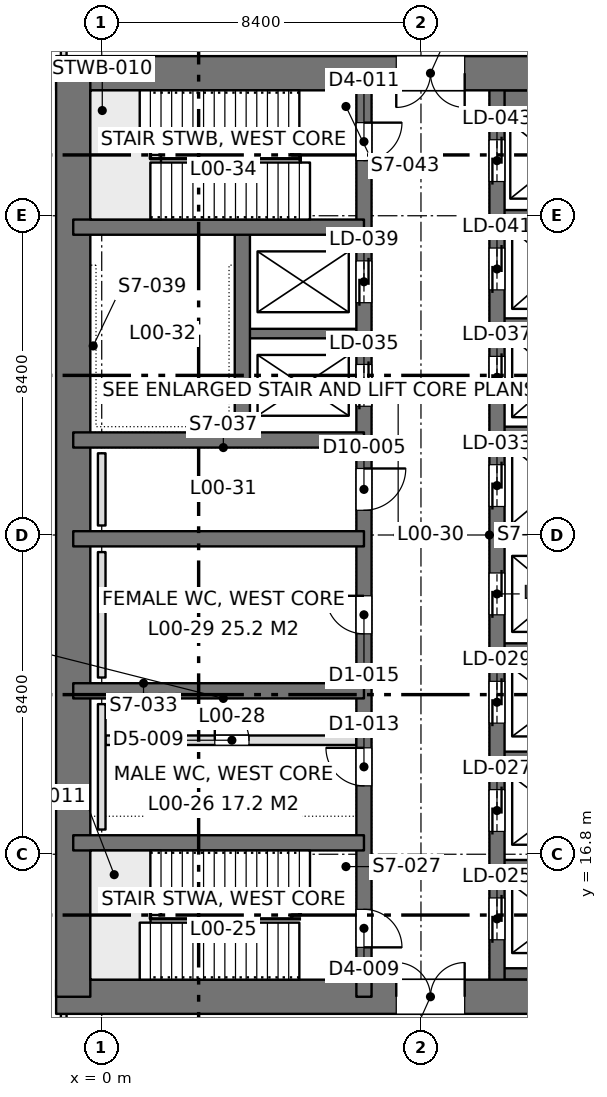
"""IFC4 building model, lengths in metres.
Left out: names, types, materials, properties, quantities, classifications, styles, units other than length and angle.
Written with IfcOpenShell. Run it as: python <this file> out.ifc"""

import sys

from ifc_helpers import new_model, si_unit, direction, frame, frame_2d, origin, place, context, subcontext, project, spatial, rectangle, extrude, element, fill, save


model = new_model("IFC4")
c1 = context("Model", 3, precision=1e-05, world=origin(), true_north=direction((0.0, 1.0)))
c2 = subcontext(c1, "Body", "Model", "MODEL_VIEW")
j1 = project(units=[si_unit("LENGTHUNIT", "METRE"), si_unit("PLANEANGLEUNIT", "RADIAN")], contexts=[c1])
p1 = place(None, origin())
s1 = spatial("IfcSite", under=j1, at=p1, CompositionType="ELEMENT")
p2 = place(p1, origin())
s2 = spatial("IfcBuilding", under=s1, at=p2, CompositionType="ELEMENT")
p3 = place(p2, origin())
s3 = spatial("IfcBuildingStorey", under=s2, at=p3, CompositionType="ELEMENT", Elevation=0.0)
p4 = place(p3, frame((-1.2, 13.05, 0.0), z_axis=(0.0, 0.0, 1.0), x_axis=(1.0, 0.0, 0.0)))
e1 = element("IfcWall", 1, at=p4, inside=s3, PredefinedType="SHEAR", context=c2, shape_type="SweptSolid", body=[
    extrude(rectangle(XDim=18.0, YDim=0.9, at=frame_2d((9.0, 0.0))), origin(), (0.0, 0.0, 1.0), 5.4),
])
p5 = place(p4, frame((8.95, 0.0, 0.0)))
e2 = element("IfcOpeningElement", 2, at=p5, cuts=e1, PredefinedType="OPENING", context=c2, shape_type="SweptSolid", body=[
    extrude(rectangle(XDim=1.8, YDim=2.4, at=frame_2d((0.9, 1.2))), frame((0.0, 0.46, 0.0), z_axis=(0.0, -1.0, 0.0), x_axis=(1.0, 0.0, 0.0)), (0.0, 0.0, 1.0), 0.92),
])
p6 = place(p3, frame((-1.2, 37.35, 0.0), z_axis=(0.0, 0.0, 1.0), x_axis=(1.0, 0.0, 0.0)))
e3 = element("IfcWall", 3, at=p6, inside=s3, PredefinedType="SHEAR", context=c2, shape_type="SweptSolid", body=[
    extrude(rectangle(XDim=18.0, YDim=0.9, at=frame_2d((9.0, 0.0))), origin(), (0.0, 0.0, 1.0), 5.4),
])
p7 = place(p6, frame((8.95, 0.0, 0.0)))
e4 = element("IfcOpeningElement", 4, at=p7, cuts=e3, PredefinedType="OPENING", context=c2, shape_type="SweptSolid", body=[
    extrude(rectangle(XDim=1.8, YDim=2.4, at=frame_2d((0.9, 1.2))), frame((0.0, 0.46, 0.0), z_axis=(0.0, -1.0, 0.0), x_axis=(1.0, 0.0, 0.0)), (0.0, 0.0, 1.0), 0.92),
])
p8 = place(p3, frame((-0.75, 13.05, 0.0), z_axis=(0.0, 0.0, 1.0), x_axis=(0.0, 1.0, 0.0)))
e5 = element("IfcWall", 5, at=p8, inside=s3, PredefinedType="SHEAR", context=c2, shape_type="SweptSolid", body=[
    extrude(rectangle(XDim=24.3, YDim=0.9, at=frame_2d((12.15, 0.0))), origin(), (0.0, 0.0, 1.0), 5.4),
])
p9 = place(p3, frame((6.9, 13.05, 0.0), z_axis=(0.0, 0.0, 1.0), x_axis=(0.0, 1.0, 0.0)))
e6 = element("IfcWall", 6, at=p9, inside=s3, PredefinedType="SHEAR", context=c2, shape_type="SweptSolid", body=[
    extrude(rectangle(XDim=24.3, YDim=0.4, at=frame_2d((12.15, 0.0))), origin(), (0.0, 0.0, 1.0), 5.4),
])
p10 = place(p9, frame((1.3, 0.0, 0.0)))
e7 = element("IfcOpeningElement", 7, at=p10, cuts=e6, PredefinedType="OPENING", context=c2, shape_type="SweptSolid", body=[
    extrude(rectangle(XDim=1.0, YDim=2.2, at=frame_2d((0.5, 1.1))), frame((0.0, 0.21, 0.0), z_axis=(0.0, -1.0, 0.0), x_axis=(1.0, 0.0, 0.0)), (0.0, 0.0, 1.0), 0.42),
])
p11 = place(p9, frame((22.0, 0.0, 0.0)))
e8 = element("IfcOpeningElement", 8, at=p11, cuts=e6, PredefinedType="OPENING", context=c2, shape_type="SweptSolid", body=[
    extrude(rectangle(XDim=1.0, YDim=2.2, at=frame_2d((0.5, 1.1))), frame((0.0, 0.21, 0.0), z_axis=(0.0, -1.0, 0.0), x_axis=(1.0, 0.0, 0.0)), (0.0, 0.0, 1.0), 0.42),
])
p12 = place(p9, frame((5.55, 0.0, 0.0)))
e9 = element("IfcOpeningElement", 9, at=p12, cuts=e6, PredefinedType="OPENING", context=c2, shape_type="SweptSolid", body=[
    extrude(rectangle(XDim=1.0, YDim=2.2, at=frame_2d((0.5, 1.1))), frame((0.0, 0.21, 0.0), z_axis=(0.0, -1.0, 0.0), x_axis=(1.0, 0.0, 0.0)), (0.0, 0.0, 1.0), 0.42),
])
p13 = place(p9, frame((9.55, 0.0, 0.0)))
e10 = element("IfcOpeningElement", 10, at=p13, cuts=e6, PredefinedType="OPENING", context=c2, shape_type="SweptSolid", body=[
    extrude(rectangle(XDim=1.0, YDim=2.2, at=frame_2d((0.5, 1.1))), frame((0.0, 0.21, 0.0), z_axis=(0.0, -1.0, 0.0), x_axis=(1.0, 0.0, 0.0)), (0.0, 0.0, 1.0), 0.42),
])
p14 = place(p9, frame((12.8, 0.0, 0.0)))
e11 = element("IfcOpeningElement", 11, at=p14, cuts=e6, PredefinedType="OPENING", context=c2, shape_type="SweptSolid", body=[
    extrude(rectangle(XDim=1.1, YDim=2.2, at=frame_2d((0.55, 1.1))), frame((0.0, 0.21, 0.0), z_axis=(0.0, -1.0, 0.0), x_axis=(1.0, 0.0, 0.0)), (0.0, 0.0, 1.0), 0.42),
])
p15 = place(p9, frame((15.538, 0.0, 0.0)))
e12 = element("IfcOpeningElement", 12, at=p15, cuts=e6, PredefinedType="OPENING", context=c2, shape_type="SweptSolid", body=[
    extrude(rectangle(XDim=1.1, YDim=2.2, at=frame_2d((0.55, 1.1))), frame((0.0, 0.21, 0.0), z_axis=(0.0, -1.0, 0.0), x_axis=(1.0, 0.0, 0.0)), (0.0, 0.0, 1.0), 0.42),
])
p16 = place(p9, frame((18.262, 0.0, 0.0)))
e13 = element("IfcOpeningElement", 13, at=p16, cuts=e6, PredefinedType="OPENING", context=c2, shape_type="SweptSolid", body=[
    extrude(rectangle(XDim=1.1, YDim=2.2, at=frame_2d((0.55, 1.1))), frame((0.0, 0.21, 0.0), z_axis=(0.0, -1.0, 0.0), x_axis=(1.0, 0.0, 0.0)), (0.0, 0.0, 1.0), 0.42),
])
p17 = place(p3, frame((10.4, 13.05, 0.0), z_axis=(0.0, 0.0, 1.0), x_axis=(0.0, 1.0, 0.0)))
e14 = element("IfcWall", 14, at=p17, inside=s3, PredefinedType="SHEAR", context=c2, shape_type="SweptSolid", body=[
    extrude(rectangle(XDim=24.3, YDim=0.4, at=frame_2d((12.15, 0.0))), origin(), (0.0, 0.0, 1.0), 5.4),
])
p18 = place(p17, frame((1.5, 0.0, 0.0)))
e15 = element("IfcOpeningElement", 15, at=p18, cuts=e14, PredefinedType="OPENING", context=c2, shape_type="SweptSolid", body=[
    extrude(rectangle(XDim=1.1, YDim=2.2, at=frame_2d((0.55, 1.1))), frame((0.0, 0.21, 0.0), z_axis=(0.0, -1.0, 0.0), x_axis=(1.0, 0.0, 0.0)), (0.0, 0.0, 1.0), 0.42),
])
p19 = place(p17, frame((4.35, 0.0, 0.0)))
e16 = element("IfcOpeningElement", 16, at=p19, cuts=e14, PredefinedType="OPENING", context=c2, shape_type="SweptSolid", body=[
    extrude(rectangle(XDim=1.1, YDim=2.2, at=frame_2d((0.55, 1.1))), frame((0.0, 0.21, 0.0), z_axis=(0.0, -1.0, 0.0), x_axis=(1.0, 0.0, 0.0)), (0.0, 0.0, 1.0), 0.42),
])
p20 = place(p17, frame((7.2, 0.0, 0.0)))
e17 = element("IfcOpeningElement", 17, at=p20, cuts=e14, PredefinedType="OPENING", context=c2, shape_type="SweptSolid", body=[
    extrude(rectangle(XDim=1.1, YDim=2.2, at=frame_2d((0.55, 1.1))), frame((0.0, 0.21, 0.0), z_axis=(0.0, -1.0, 0.0), x_axis=(1.0, 0.0, 0.0)), (0.0, 0.0, 1.0), 0.42),
])
p21 = place(p17, frame((10.05, 0.0, 0.0)))
e18 = element("IfcOpeningElement", 18, at=p21, cuts=e14, PredefinedType="OPENING", context=c2, shape_type="SweptSolid", body=[
    extrude(rectangle(XDim=1.1, YDim=2.2, at=frame_2d((0.55, 1.1))), frame((0.0, 0.21, 0.0), z_axis=(0.0, -1.0, 0.0), x_axis=(1.0, 0.0, 0.0)), (0.0, 0.0, 1.0), 0.42),
])
p22 = place(p17, frame((12.9, 0.0, 0.0)))
e19 = element("IfcOpeningElement", 19, at=p22, cuts=e14, PredefinedType="OPENING", context=c2, shape_type="SweptSolid", body=[
    extrude(rectangle(XDim=1.1, YDim=2.2, at=frame_2d((0.55, 1.1))), frame((0.0, 0.21, 0.0), z_axis=(0.0, -1.0, 0.0), x_axis=(1.0, 0.0, 0.0)), (0.0, 0.0, 1.0), 0.42),
])
p23 = place(p17, frame((15.75, 0.0, 0.0)))
e20 = element("IfcOpeningElement", 20, at=p23, cuts=e14, PredefinedType="OPENING", context=c2, shape_type="SweptSolid", body=[
    extrude(rectangle(XDim=1.1, YDim=2.2, at=frame_2d((0.55, 1.1))), frame((0.0, 0.21, 0.0), z_axis=(0.0, -1.0, 0.0), x_axis=(1.0, 0.0, 0.0)), (0.0, 0.0, 1.0), 0.42),
])
p24 = place(p17, frame((18.6, 0.0, 0.0)))
e21 = element("IfcOpeningElement", 21, at=p24, cuts=e14, PredefinedType="OPENING", context=c2, shape_type="SweptSolid", body=[
    extrude(rectangle(XDim=1.1, YDim=2.2, at=frame_2d((0.55, 1.1))), frame((0.0, 0.21, 0.0), z_axis=(0.0, -1.0, 0.0), x_axis=(1.0, 0.0, 0.0)), (0.0, 0.0, 1.0), 0.42),
])
p25 = place(p17, frame((21.45, 0.0, 0.0)))
e22 = element("IfcOpeningElement", 22, at=p25, cuts=e14, PredefinedType="OPENING", context=c2, shape_type="SweptSolid", body=[
    extrude(rectangle(XDim=1.1, YDim=2.2, at=frame_2d((0.55, 1.1))), frame((0.0, 0.21, 0.0), z_axis=(0.0, -1.0, 0.0), x_axis=(1.0, 0.0, 0.0)), (0.0, 0.0, 1.0), 0.42),
])
for number, where, z_axis, x_axis in (
    (23, (-0.75, 17.1, 0.0), (0.0, 0.0, 1.0), (1.0, 0.0, 0.0)),
    (24, (-0.75, 21.1, 0.0), (0.0, 0.0, 1.0), (1.0, 0.0, 0.0)),
    (25, (-0.75, 25.1, 0.0), (0.0, 0.0, 1.0), (1.0, 0.0, 0.0)),
    (26, (-0.75, 27.7, 0.0), (0.0, 0.0, 1.0), (1.0, 0.0, 0.0)),
    (27, (-0.75, 33.3, 0.0), (0.0, 0.0, 1.0), (1.0, 0.0, 0.0)),
):
    element("IfcWall", number, at=place(p3, frame(where, z_axis=z_axis, x_axis=x_axis)), inside=s3, PredefinedType="SHEAR", context=c2, shape_type="SweptSolid", body=[
        extrude(rectangle(XDim=7.65, YDim=0.4, at=frame_2d((3.825, 0.0))), origin(), (0.0, 0.0, 1.0), 5.4),
    ])
p26 = place(p3, frame((3.7, 27.7, 0.0), z_axis=(0.0, 0.0, 1.0), x_axis=(0.0, 1.0, 0.0)))
e28 = element("IfcWall", 28, at=p26, inside=s3, PredefinedType="SHEAR", context=c2, shape_type="SweptSolid", body=[
    extrude(rectangle(XDim=5.6, YDim=0.4, at=frame_2d((2.8, 0.0))), origin(), (0.0, 0.0, 1.0), 5.4),
])
p27 = place(p3, frame((3.7, 30.5, 0.0), z_axis=(0.0, 0.0, 1.0), x_axis=(1.0, 0.0, 0.0)))
e29 = element("IfcWall", 29, at=p27, inside=s3, PredefinedType="SHEAR", context=c2, shape_type="SweptSolid", body=[
    extrude(rectangle(XDim=3.2, YDim=0.25, at=frame_2d((1.6, 0.0))), origin(), (0.0, 0.0, 1.0), 5.4),
])
p28 = place(p3, frame((10.4, 13.65, 0.0), z_axis=(0.0, 0.0, 1.0), x_axis=(1.0, 0.0, 0.0)))
e30 = element("IfcWall", 30, at=p28, inside=s3, PredefinedType="SHEAR", context=c2, shape_type="SweptSolid", body=[
    extrude(rectangle(XDim=3.2, YDim=0.3, at=frame_2d((1.6, 0.0))), origin(), (0.0, 0.0, 1.0), 5.4),
])
for number, where, z_axis, x_axis in (
    (31, (10.4, 16.525, 0.0), (0.0, 0.0, 1.0), (1.0, 0.0, 0.0)),
    (32, (10.4, 19.375, 0.0), (0.0, 0.0, 1.0), (1.0, 0.0, 0.0)),
    (33, (10.4, 22.225, 0.0), (0.0, 0.0, 1.0), (1.0, 0.0, 0.0)),
    (34, (10.4, 25.075, 0.0), (0.0, 0.0, 1.0), (1.0, 0.0, 0.0)),
    (35, (10.4, 27.925, 0.0), (0.0, 0.0, 1.0), (1.0, 0.0, 0.0)),
    (36, (10.4, 30.775, 0.0), (0.0, 0.0, 1.0), (1.0, 0.0, 0.0)),
    (37, (10.4, 33.625, 0.0), (0.0, 0.0, 1.0), (1.0, 0.0, 0.0)),
):
    element("IfcWall", number, at=place(p3, frame(where, z_axis=z_axis, x_axis=x_axis)), inside=s3, PredefinedType="SHEAR", context=c2, shape_type="SweptSolid", body=[
        extrude(rectangle(XDim=3.2, YDim=0.25, at=frame_2d((1.6, 0.0))), origin(), (0.0, 0.0, 1.0), 5.4),
    ])
p29 = place(p3, frame((10.4, 36.625, 0.0), z_axis=(0.0, 0.0, 1.0), x_axis=(1.0, 0.0, 0.0)))
e38 = element("IfcWall", 38, at=p29, inside=s3, PredefinedType="SHEAR", context=c2, shape_type="SweptSolid", body=[
    extrude(rectangle(XDim=3.2, YDim=0.55, at=frame_2d((1.6, 0.0))), origin(), (0.0, 0.0, 1.0), 5.4),
])
p30 = place(p3, frame((-1.0, -0.926, 0.0), z_axis=(0.0, 0.0, 1.0), x_axis=(0.0, 1.0, 0.0)))
e39 = element("IfcWall", 39, at=p30, inside=s3, PredefinedType="PARTITIONING", context=c2, shape_type="SweptSolid", body=[
    extrude(rectangle(XDim=13.528, YDim=0.15, at=frame_2d((6.764, 0.0))), origin(), (0.0, 0.0, 1.0), 4.6),
])
p31 = place(p30, frame((4.626, 0.0, 0.0)))
e40 = element("IfcOpeningElement", 40, at=p31, cuts=e39, PredefinedType="OPENING", context=c2, shape_type="SweptSolid", body=[
    extrude(rectangle(XDim=1.0, YDim=2.2, at=frame_2d((0.5, 1.1))), frame((0.0, 0.085, 0.0), z_axis=(0.0, -1.0, 0.0), x_axis=(1.0, 0.0, 0.0)), (0.0, 0.0, 1.0), 0.17),
])
p32 = place(p3, frame((-1.0, 37.8, 0.0), z_axis=(0.0, 0.0, 1.0), x_axis=(0.0, 1.0, 0.0)))
e41 = element("IfcWall", 41, at=p32, inside=s3, PredefinedType="PARTITIONING", context=c2, shape_type="SweptSolid", body=[
    extrude(rectangle(XDim=6.48, YDim=0.15, at=frame_2d((3.24, 0.0))), origin(), (0.0, 0.0, 1.0), 4.6),
])
p33 = place(p32, frame((1.6, 0.0, 0.0)))
e42 = element("IfcOpeningElement", 42, at=p33, cuts=e41, PredefinedType="OPENING", context=c2, shape_type="SweptSolid", body=[
    extrude(rectangle(XDim=1.0, YDim=2.2, at=frame_2d((0.5, 1.1))), frame((0.0, 0.085, 0.0), z_axis=(0.0, -1.0, 0.0), x_axis=(1.0, 0.0, 0.0)), (0.0, 0.0, 1.0), 0.17),
])
p34 = place(p3, frame((0.1, 19.8, 0.0), z_axis=(0.0, 0.0, 1.0), x_axis=(1.0, 0.0, 0.0)))
e43 = element("IfcWall", 43, at=p34, inside=s3, PredefinedType="PARTITIONING", context=c2, shape_type="SweptSolid", body=[
    extrude(rectangle(XDim=6.6, YDim=0.25, at=frame_2d((3.3, 0.0))), origin(), (0.0, 0.0, 1.0), 5.2),
])
p35 = place(p34, frame((2.875, 0.0, 0.0)))
e44 = element("IfcOpeningElement", 44, at=p35, cuts=e43, PredefinedType="OPENING", context=c2, shape_type="SweptSolid", body=[
    extrude(rectangle(XDim=0.9, YDim=2.2, at=frame_2d((0.45, 1.1))), frame((0.0, 0.135, 0.0), z_axis=(0.0, -1.0, 0.0), x_axis=(1.0, 0.0, 0.0)), (0.0, 0.0, 1.0), 0.27),
])
for number, where, z_axis, x_axis in (
    (45, (0.0, 17.45, 0.0), (0.0, 0.0, 1.0), (0.0, 1.0, 0.0)),
    (46, (0.0, 21.45, 0.0), (0.0, 0.0, 1.0), (0.0, 1.0, 0.0)),
):
    element("IfcWall", number, at=place(p3, frame(where, z_axis=z_axis, x_axis=x_axis)), inside=s3, PredefinedType="PLUMBINGWALL", context=c2, shape_type="SweptSolid", body=[
        extrude(rectangle(XDim=3.3, YDim=0.2, at=frame_2d((1.65, 0.0))), origin(), (0.0, 0.0, 1.0), 1.2),
    ])
p36 = place(p3, frame((0.0, 25.45, 0.0), z_axis=(0.0, 0.0, 1.0), x_axis=(0.0, 1.0, 0.0)))
e47 = element("IfcWall", 47, at=p36, inside=s3, PredefinedType="PLUMBINGWALL", context=c2, shape_type="SweptSolid", body=[
    extrude(rectangle(XDim=1.9, YDim=0.2, at=frame_2d((0.95, 0.0))), origin(), (0.0, 0.0, 1.0), 1.2),
])
p37 = place(p5, origin())
e48 = element("IfcDoor", 48, at=p37, inside=s3, OperationType="DOUBLE_DOOR_SINGLE_SWING", PredefinedType="DOOR", context=c2, shape_type="SweptSolid", body=[
    extrude(rectangle(XDim=1.8, YDim=2.4, at=frame_2d((0.9, 1.2))), frame((0.0, 0.025, 0.0), z_axis=(0.0, -1.0, 0.0), x_axis=(1.0, 0.0, 0.0)), (0.0, 0.0, 1.0), 0.05),
])
fill(e2, e48)
p38 = place(p7, frame((1.8, 0.0, 0.0), z_axis=(0.0, 0.0, 1.0), x_axis=(-1.0, 0.0, 0.0)))
e49 = element("IfcDoor", 49, at=p38, inside=s3, OperationType="DOUBLE_DOOR_SINGLE_SWING", PredefinedType="DOOR", context=c2, shape_type="SweptSolid", body=[
    extrude(rectangle(XDim=1.8, YDim=2.4, at=frame_2d((0.9, 1.2))), frame((0.0, 0.025, 0.0), z_axis=(0.0, -1.0, 0.0), x_axis=(1.0, 0.0, 0.0)), (0.0, 0.0, 1.0), 0.05),
])
fill(e4, e49)
p39 = place(p10, frame((1.0, 0.0, 0.0), z_axis=(0.0, 0.0, 1.0), x_axis=(-1.0, 0.0, 0.0)))
e50 = element("IfcDoor", 50, at=p39, inside=s3, OperationType="SINGLE_SWING_RIGHT", PredefinedType="DOOR", context=c2, shape_type="SweptSolid", body=[
    extrude(rectangle(XDim=1.0, YDim=2.2, at=frame_2d((0.5, 1.1))), frame((0.0, 0.025, 0.0), z_axis=(0.0, -1.0, 0.0), x_axis=(1.0, 0.0, 0.0)), (0.0, 0.0, 1.0), 0.05),
])
fill(e7, e50)
p40 = place(p11, frame((1.0, 0.0, 0.0), z_axis=(0.0, 0.0, 1.0), x_axis=(-1.0, 0.0, 0.0)))
e51 = element("IfcDoor", 51, at=p40, inside=s3, OperationType="SINGLE_SWING_LEFT", PredefinedType="DOOR", context=c2, shape_type="SweptSolid", body=[
    extrude(rectangle(XDim=1.0, YDim=2.2, at=frame_2d((0.5, 1.1))), frame((0.0, 0.025, 0.0), z_axis=(0.0, -1.0, 0.0), x_axis=(1.0, 0.0, 0.0)), (0.0, 0.0, 1.0), 0.05),
])
fill(e8, e51)
p41 = place(p12, origin())
e52 = element("IfcDoor", 52, at=p41, inside=s3, OperationType="SINGLE_SWING_RIGHT", PredefinedType="DOOR", context=c2, shape_type="SweptSolid", body=[
    extrude(rectangle(XDim=1.0, YDim=2.2, at=frame_2d((0.5, 1.1))), frame((0.0, 0.025, 0.0), z_axis=(0.0, -1.0, 0.0), x_axis=(1.0, 0.0, 0.0)), (0.0, 0.0, 1.0), 0.05),
])
fill(e9, e52)
p42 = place(p13, origin())
e53 = element("IfcDoor", 53, at=p42, inside=s3, OperationType="SINGLE_SWING_RIGHT", PredefinedType="DOOR", context=c2, shape_type="SweptSolid", body=[
    extrude(rectangle(XDim=1.0, YDim=2.2, at=frame_2d((0.5, 1.1))), frame((0.0, 0.025, 0.0), z_axis=(0.0, -1.0, 0.0), x_axis=(1.0, 0.0, 0.0)), (0.0, 0.0, 1.0), 0.05),
])
fill(e10, e53)
p43 = place(p14, frame((1.1, 0.0, 0.0), z_axis=(0.0, 0.0, 1.0), x_axis=(-1.0, 0.0, 0.0)))
e54 = element("IfcDoor", 54, at=p43, inside=s3, OperationType="SINGLE_SWING_LEFT", PredefinedType="DOOR", context=c2, shape_type="SweptSolid", body=[
    extrude(rectangle(XDim=1.1, YDim=2.2, at=frame_2d((0.55, 1.1))), frame((0.0, 0.025, 0.0), z_axis=(0.0, -1.0, 0.0), x_axis=(1.0, 0.0, 0.0)), (0.0, 0.0, 1.0), 0.05),
])
fill(e11, e54)
p44 = place(p18, origin())
e55 = element("IfcDoor", 55, at=p44, inside=s3, OperationType="DOUBLE_DOOR_SLIDING", PredefinedType="DOOR", context=c2, shape_type="SweptSolid", body=[
    extrude(rectangle(XDim=1.1, YDim=2.2, at=frame_2d((0.55, 1.1))), frame((0.0, 0.025, 0.0), z_axis=(0.0, -1.0, 0.0), x_axis=(1.0, 0.0, 0.0)), (0.0, 0.0, 1.0), 0.05),
])
fill(e15, e55)
p45 = place(p19, origin())
e56 = element("IfcDoor", 56, at=p45, inside=s3, OperationType="DOUBLE_DOOR_SLIDING", PredefinedType="DOOR", context=c2, shape_type="SweptSolid", body=[
    extrude(rectangle(XDim=1.1, YDim=2.2, at=frame_2d((0.55, 1.1))), frame((0.0, 0.025, 0.0), z_axis=(0.0, -1.0, 0.0), x_axis=(1.0, 0.0, 0.0)), (0.0, 0.0, 1.0), 0.05),
])
fill(e16, e56)
p46 = place(p20, origin())
e57 = element("IfcDoor", 57, at=p46, inside=s3, OperationType="DOUBLE_DOOR_SLIDING", PredefinedType="DOOR", context=c2, shape_type="SweptSolid", body=[
    extrude(rectangle(XDim=1.1, YDim=2.2, at=frame_2d((0.55, 1.1))), frame((0.0, 0.025, 0.0), z_axis=(0.0, -1.0, 0.0), x_axis=(1.0, 0.0, 0.0)), (0.0, 0.0, 1.0), 0.05),
])
fill(e17, e57)
p47 = place(p21, origin())
e58 = element("IfcDoor", 58, at=p47, inside=s3, OperationType="DOUBLE_DOOR_SLIDING", PredefinedType="DOOR", context=c2, shape_type="SweptSolid", body=[
    extrude(rectangle(XDim=1.1, YDim=2.2, at=frame_2d((0.55, 1.1))), frame((0.0, 0.025, 0.0), z_axis=(0.0, -1.0, 0.0), x_axis=(1.0, 0.0, 0.0)), (0.0, 0.0, 1.0), 0.05),
])
fill(e18, e58)
p48 = place(p22, origin())
e59 = element("IfcDoor", 59, at=p48, inside=s3, OperationType="DOUBLE_DOOR_SLIDING", PredefinedType="DOOR", context=c2, shape_type="SweptSolid", body=[
    extrude(rectangle(XDim=1.1, YDim=2.2, at=frame_2d((0.55, 1.1))), frame((0.0, 0.025, 0.0), z_axis=(0.0, -1.0, 0.0), x_axis=(1.0, 0.0, 0.0)), (0.0, 0.0, 1.0), 0.05),
])
fill(e19, e59)
p49 = place(p23, origin())
e60 = element("IfcDoor", 60, at=p49, inside=s3, OperationType="DOUBLE_DOOR_SLIDING", PredefinedType="DOOR", context=c2, shape_type="SweptSolid", body=[
    extrude(rectangle(XDim=1.1, YDim=2.2, at=frame_2d((0.55, 1.1))), frame((0.0, 0.025, 0.0), z_axis=(0.0, -1.0, 0.0), x_axis=(1.0, 0.0, 0.0)), (0.0, 0.0, 1.0), 0.05),
])
fill(e20, e60)
p50 = place(p24, origin())
e61 = element("IfcDoor", 61, at=p50, inside=s3, OperationType="DOUBLE_DOOR_SLIDING", PredefinedType="DOOR", context=c2, shape_type="SweptSolid", body=[
    extrude(rectangle(XDim=1.1, YDim=2.2, at=frame_2d((0.55, 1.1))), frame((0.0, 0.025, 0.0), z_axis=(0.0, -1.0, 0.0), x_axis=(1.0, 0.0, 0.0)), (0.0, 0.0, 1.0), 0.05),
])
fill(e21, e61)
p51 = place(p25, origin())
e62 = element("IfcDoor", 62, at=p51, inside=s3, OperationType="DOUBLE_DOOR_SLIDING", PredefinedType="DOOR", context=c2, shape_type="SweptSolid", body=[
    extrude(rectangle(XDim=1.1, YDim=2.2, at=frame_2d((0.55, 1.1))), frame((0.0, 0.025, 0.0), z_axis=(0.0, -1.0, 0.0), x_axis=(1.0, 0.0, 0.0)), (0.0, 0.0, 1.0), 0.05),
])
fill(e22, e62)
p52 = place(p15, origin())
e63 = element("IfcDoor", 63, at=p52, inside=s3, OperationType="DOUBLE_DOOR_SLIDING", PredefinedType="DOOR", context=c2, shape_type="SweptSolid", body=[
    extrude(rectangle(XDim=1.1, YDim=2.2, at=frame_2d((0.55, 1.1))), frame((0.0, 0.025, 0.0), z_axis=(0.0, -1.0, 0.0), x_axis=(1.0, 0.0, 0.0)), (0.0, 0.0, 1.0), 0.05),
])
fill(e12, e63)
p53 = place(p16, origin())
e64 = element("IfcDoor", 64, at=p53, inside=s3, OperationType="DOUBLE_DOOR_SLIDING", PredefinedType="DOOR", context=c2, shape_type="SweptSolid", body=[
    extrude(rectangle(XDim=1.1, YDim=2.2, at=frame_2d((0.55, 1.1))), frame((0.0, 0.025, 0.0), z_axis=(0.0, -1.0, 0.0), x_axis=(1.0, 0.0, 0.0)), (0.0, 0.0, 1.0), 0.05),
])
fill(e13, e64)
p54 = place(p35, origin())
e65 = element("IfcDoor", 65, at=p54, inside=s3, OperationType="SINGLE_SWING_LEFT", PredefinedType="DOOR", context=c2, shape_type="SweptSolid", body=[
    extrude(rectangle(XDim=0.9, YDim=2.2, at=frame_2d((0.45, 1.1))), frame((0.0, 0.025, 0.0), z_axis=(0.0, -1.0, 0.0), x_axis=(1.0, 0.0, 0.0)), (0.0, 0.0, 1.0), 0.05),
])
fill(e44, e65)
save(model, sys.argv[1])
